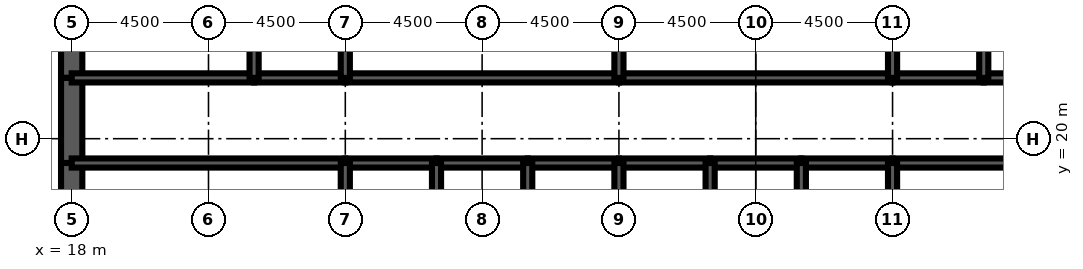
"""IFC4 building model, lengths in metres.
Left out: names, types, materials, properties, quantities, classifications, styles, units other than length and angle.
Written with IfcOpenShell. Run it as: python <this file> out.ifc"""

import sys

from ifc_helpers import new_model, si_unit, direction, frame, frame_2d, origin, place, context, subcontext, project, spatial, rectangle, extrude, element, fill, save


model = new_model("IFC4")
c1 = context("Model", 3, precision=1e-05, world=origin(), true_north=direction((0.0, 1.0)))
c2 = subcontext(c1, "Body", "Model", "MODEL_VIEW")
j1 = project(units=[si_unit("LENGTHUNIT", "METRE"), si_unit("PLANEANGLEUNIT", "RADIAN")], contexts=[c1])
p1 = place(None, origin())
s1 = spatial("IfcSite", under=j1, at=p1, CompositionType="ELEMENT")
p2 = place(p1, origin())
s2 = spatial("IfcBuilding", under=s1, at=p2, CompositionType="ELEMENT")
p3 = place(p2, frame((0.0, 0.0, 283.7)))
s3 = spatial("IfcBuildingStorey", under=s2, at=p3, CompositionType="ELEMENT", Elevation=283.7)
p4 = place(p3, frame((18.0, 26.0, 0.0), z_axis=(0.0, 0.0, 1.0), x_axis=(0.0, -1.0, 0.0)))
e1 = element("IfcWall", 1, at=p4, inside=s3, PredefinedType="SHEAR", context=c2, shape_type="SweptSolid", body=[
    extrude(rectangle(XDim=4.0, YDim=0.7, at=frame_2d((2.0, 0.0))), origin(), (0.0, 0.0, 1.0), 4.2),
])
p5 = place(p3, frame((18.0, 22.0, 0.0), z_axis=(0.0, 0.0, 1.0), x_axis=(0.0, -1.0, 0.0)))
e2 = element("IfcWall", 2, at=p5, inside=s3, PredefinedType="SHEAR", context=c2, shape_type="SweptSolid", body=[
    extrude(rectangle(XDim=2.8, YDim=0.7, at=frame_2d((1.4, 0.0))), origin(), (0.0, 0.0, 1.0), 4.2),
])
p6 = place(p5, frame((0.6, 0.0, 0.0)))
e3 = element("IfcOpeningElement", 3, at=p6, cuts=e2, PredefinedType="OPENING", context=c2, shape_type="SweptSolid", body=[
    extrude(rectangle(XDim=1.8, YDim=2.1, at=frame_2d((0.9, 1.05))), frame((0.0, 0.36, 0.0), z_axis=(0.0, -1.0, 0.0), x_axis=(1.0, 0.0, 0.0)), (0.0, 0.0, 1.0), 0.72),
])
p7 = place(p3, frame((18.0, 19.2, 0.0), z_axis=(0.0, 0.0, 1.0), x_axis=(0.0, -1.0, 0.0)))
e4 = element("IfcWall", 4, at=p7, inside=s3, PredefinedType="SHEAR", context=c2, shape_type="SweptSolid", body=[
    extrude(rectangle(XDim=3.2, YDim=0.7, at=frame_2d((1.6, 0.0))), origin(), (0.0, 0.0, 1.0), 4.2),
])
p8 = place(p3, frame((18.0, 19.2, 0.0), z_axis=(0.0, 0.0, 1.0), x_axis=(1.0, 0.0, 0.0)))
e5 = element("IfcWall", 5, at=p8, inside=s3, PredefinedType="SOLIDWALL", context=c2, shape_type="SweptSolid", body=[
    extrude(rectangle(XDim=9.0, YDim=0.3, at=frame_2d((4.5, 0.0))), origin(), (0.0, 0.0, 1.0), 4.2),
])
p9 = place(p8, frame((0.65, 0.0, 0.0)))
e6 = element("IfcOpeningElement", 6, at=p9, cuts=e5, PredefinedType="OPENING", context=c2, shape_type="SweptSolid", body=[
    extrude(rectangle(XDim=1.0, YDim=2.1, at=frame_2d((0.5, 1.05))), frame((0.0, 0.16, 0.0), z_axis=(0.0, -1.0, 0.0), x_axis=(1.0, 0.0, 0.0)), (0.0, 0.0, 1.0), 0.32),
])
p10 = place(p3, frame((27.0, 19.2, 0.0), z_axis=(0.0, 0.0, 1.0), x_axis=(1.0, 0.0, 0.0)))
e7 = element("IfcWall", 7, at=p10, inside=s3, PredefinedType="SOLIDWALL", context=c2, shape_type="SweptSolid", body=[
    extrude(rectangle(XDim=3.0, YDim=0.3, at=frame_2d((1.5, 0.0))), origin(), (0.0, 0.0, 1.0), 4.2),
])
p11 = place(p10, frame((0.95, 0.0, 0.0)))
e8 = element("IfcOpeningElement", 8, at=p11, cuts=e7, PredefinedType="OPENING", context=c2, shape_type="SweptSolid", body=[
    extrude(rectangle(XDim=1.1, YDim=2.2, at=frame_2d((0.55, 1.1))), frame((0.0, 0.16, 0.0), z_axis=(0.0, -1.0, 0.0), x_axis=(1.0, 0.0, 0.0)), (0.0, 0.0, 1.0), 0.32),
])
p12 = place(p3, frame((30.0, 19.2, 0.0), z_axis=(0.0, 0.0, 1.0), x_axis=(1.0, 0.0, 0.0)))
e9 = element("IfcWall", 9, at=p12, inside=s3, PredefinedType="SOLIDWALL", context=c2, shape_type="SweptSolid", body=[
    extrude(rectangle(XDim=3.0, YDim=0.3, at=frame_2d((1.5, 0.0))), origin(), (0.0, 0.0, 1.0), 4.2),
])
p13 = place(p12, frame((0.95, 0.0, 0.0)))
e10 = element("IfcOpeningElement", 10, at=p13, cuts=e9, PredefinedType="OPENING", context=c2, shape_type="SweptSolid", body=[
    extrude(rectangle(XDim=1.1, YDim=2.2, at=frame_2d((0.55, 1.1))), frame((0.0, 0.16, 0.0), z_axis=(0.0, -1.0, 0.0), x_axis=(1.0, 0.0, 0.0)), (0.0, 0.0, 1.0), 0.32),
])
p14 = place(p3, frame((33.0, 19.2, 0.0), z_axis=(0.0, 0.0, 1.0), x_axis=(1.0, 0.0, 0.0)))
e11 = element("IfcWall", 11, at=p14, inside=s3, PredefinedType="SOLIDWALL", context=c2, shape_type="SweptSolid", body=[
    extrude(rectangle(XDim=3.0, YDim=0.3, at=frame_2d((1.5, 0.0))), origin(), (0.0, 0.0, 1.0), 4.2),
])
p15 = place(p14, frame((0.95, 0.0, 0.0)))
e12 = element("IfcOpeningElement", 12, at=p15, cuts=e11, PredefinedType="OPENING", context=c2, shape_type="SweptSolid", body=[
    extrude(rectangle(XDim=1.1, YDim=2.2, at=frame_2d((0.55, 1.1))), frame((0.0, 0.16, 0.0), z_axis=(0.0, -1.0, 0.0), x_axis=(1.0, 0.0, 0.0)), (0.0, 0.0, 1.0), 0.32),
])
p16 = place(p3, frame((36.0, 19.2, 0.0), z_axis=(0.0, 0.0, 1.0), x_axis=(1.0, 0.0, 0.0)))
e13 = element("IfcWall", 13, at=p16, inside=s3, PredefinedType="SOLIDWALL", context=c2, shape_type="SweptSolid", body=[
    extrude(rectangle(XDim=3.0, YDim=0.3, at=frame_2d((1.5, 0.0))), origin(), (0.0, 0.0, 1.0), 4.2),
])
p17 = place(p16, frame((0.95, 0.0, 0.0)))
e14 = element("IfcOpeningElement", 14, at=p17, cuts=e13, PredefinedType="OPENING", context=c2, shape_type="SweptSolid", body=[
    extrude(rectangle(XDim=1.1, YDim=2.2, at=frame_2d((0.55, 1.1))), frame((0.0, 0.16, 0.0), z_axis=(0.0, -1.0, 0.0), x_axis=(1.0, 0.0, 0.0)), (0.0, 0.0, 1.0), 0.32),
])
p18 = place(p3, frame((39.0, 19.2, 0.0), z_axis=(0.0, 0.0, 1.0), x_axis=(1.0, 0.0, 0.0)))
e15 = element("IfcWall", 15, at=p18, inside=s3, PredefinedType="SOLIDWALL", context=c2, shape_type="SweptSolid", body=[
    extrude(rectangle(XDim=3.0, YDim=0.3, at=frame_2d((1.5, 0.0))), origin(), (0.0, 0.0, 1.0), 4.2),
])
p19 = place(p18, frame((1.0, 0.0, 0.0)))
e16 = element("IfcOpeningElement", 16, at=p19, cuts=e15, PredefinedType="OPENING", context=c2, shape_type="SweptSolid", body=[
    extrude(rectangle(XDim=1.0, YDim=2.1, at=frame_2d((0.5, 1.05))), frame((0.0, 0.16, 0.0), z_axis=(0.0, -1.0, 0.0), x_axis=(1.0, 0.0, 0.0)), (0.0, 0.0, 1.0), 0.32),
])
p20 = place(p3, frame((42.0, 19.2, 0.0), z_axis=(0.0, 0.0, 1.0), x_axis=(1.0, 0.0, 0.0)))
e17 = element("IfcWall", 17, at=p20, inside=s3, PredefinedType="SOLIDWALL", context=c2, shape_type="SweptSolid", body=[
    extrude(rectangle(XDim=3.0, YDim=0.3, at=frame_2d((1.5, 0.0))), origin(), (0.0, 0.0, 1.0), 4.2),
])
p21 = place(p20, frame((1.0, 0.0, 0.0)))
e18 = element("IfcOpeningElement", 18, at=p21, cuts=e17, PredefinedType="OPENING", context=c2, shape_type="SweptSolid", body=[
    extrude(rectangle(XDim=1.0, YDim=2.1, at=frame_2d((0.5, 1.05))), frame((0.0, 0.16, 0.0), z_axis=(0.0, -1.0, 0.0), x_axis=(1.0, 0.0, 0.0)), (0.0, 0.0, 1.0), 0.32),
])
p22 = place(p3, frame((45.0, 19.2, 0.0), z_axis=(0.0, 0.0, 1.0), x_axis=(1.0, 0.0, 0.0)))
e19 = element("IfcWall", 19, at=p22, inside=s3, PredefinedType="SOLIDWALL", context=c2, shape_type="SweptSolid", body=[
    extrude(rectangle(XDim=9.0, YDim=0.3, at=frame_2d((4.5, 0.0))), origin(), (0.0, 0.0, 1.0), 4.2),
])
p23 = place(p22, frame((7.35, 0.0, 0.0)))
e20 = element("IfcOpeningElement", 20, at=p23, cuts=e19, PredefinedType="OPENING", context=c2, shape_type="SweptSolid", body=[
    extrude(rectangle(XDim=1.0, YDim=2.1, at=frame_2d((0.5, 1.05))), frame((0.0, 0.16, 0.0), z_axis=(0.0, -1.0, 0.0), x_axis=(1.0, 0.0, 0.0)), (0.0, 0.0, 1.0), 0.32),
])
p24 = place(p3, frame((18.0, 22.0, 0.0), z_axis=(0.0, 0.0, 1.0), x_axis=(1.0, 0.0, 0.0)))
e21 = element("IfcWall", 21, at=p24, inside=s3, PredefinedType="SOLIDWALL", context=c2, shape_type="SweptSolid", body=[
    extrude(rectangle(XDim=6.0, YDim=0.3, at=frame_2d((3.0, 0.0))), origin(), (0.0, 0.0, 1.0), 4.2),
])
p25 = place(p24, frame((4.4, 0.0, 0.0)))
e22 = element("IfcOpeningElement", 22, at=p25, cuts=e21, PredefinedType="OPENING", context=c2, shape_type="SweptSolid", body=[
    extrude(rectangle(XDim=1.0, YDim=2.1, at=frame_2d((0.5, 1.05))), frame((0.0, 0.16, 0.0), z_axis=(0.0, -1.0, 0.0), x_axis=(1.0, 0.0, 0.0)), (0.0, 0.0, 1.0), 0.32),
])
p26 = place(p24, frame((0.6, 0.0, 0.0)))
e23 = element("IfcOpeningElement", 23, at=p26, cuts=e21, PredefinedType="OPENING", context=c2, shape_type="SweptSolid", body=[
    extrude(rectangle(XDim=1.0, YDim=2.1, at=frame_2d((0.5, 1.05))), frame((0.0, 0.16, 0.0), z_axis=(0.0, -1.0, 0.0), x_axis=(1.0, 0.0, 0.0)), (0.0, 0.0, 1.0), 0.32),
])
p27 = place(p3, frame((24.0, 22.0, 0.0), z_axis=(0.0, 0.0, 1.0), x_axis=(1.0, 0.0, 0.0)))
e24 = element("IfcWall", 24, at=p27, inside=s3, PredefinedType="SOLIDWALL", context=c2, shape_type="SweptSolid", body=[
    extrude(rectangle(XDim=3.0, YDim=0.3, at=frame_2d((1.5, 0.0))), origin(), (0.0, 0.0, 1.0), 4.2),
])
p28 = place(p27, frame((1.0, 0.0, 0.0)))
e25 = element("IfcOpeningElement", 25, at=p28, cuts=e24, PredefinedType="OPENING", context=c2, shape_type="SweptSolid", body=[
    extrude(rectangle(XDim=1.0, YDim=2.1, at=frame_2d((0.5, 1.05))), frame((0.0, 0.16, 0.0), z_axis=(0.0, -1.0, 0.0), x_axis=(1.0, 0.0, 0.0)), (0.0, 0.0, 1.0), 0.32),
])
p29 = place(p3, frame((27.0, 22.0, 0.0), z_axis=(0.0, 0.0, 1.0), x_axis=(1.0, 0.0, 0.0)))
e26 = element("IfcWall", 26, at=p29, inside=s3, PredefinedType="SOLIDWALL", context=c2, shape_type="SweptSolid", body=[
    extrude(rectangle(XDim=9.0, YDim=0.3, at=frame_2d((4.5, 0.0))), origin(), (0.0, 0.0, 1.0), 4.2),
])
p30 = place(p29, frame((4.0, 0.0, 0.0)))
e27 = element("IfcOpeningElement", 27, at=p30, cuts=e26, PredefinedType="OPENING", context=c2, shape_type="SweptSolid", body=[
    extrude(rectangle(XDim=1.0, YDim=2.1, at=frame_2d((0.5, 1.05))), frame((0.0, 0.16, 0.0), z_axis=(0.0, -1.0, 0.0), x_axis=(1.0, 0.0, 0.0)), (0.0, 0.0, 1.0), 0.32),
])
p31 = place(p3, frame((36.0, 22.0, 0.0), z_axis=(0.0, 0.0, 1.0), x_axis=(1.0, 0.0, 0.0)))
e28 = element("IfcWall", 28, at=p31, inside=s3, PredefinedType="SOLIDWALL", context=c2, shape_type="SweptSolid", body=[
    extrude(rectangle(XDim=9.0, YDim=0.3, at=frame_2d((4.5, 0.0))), origin(), (0.0, 0.0, 1.0), 4.2),
])
p32 = place(p31, frame((4.0, 0.0, 0.0)))
e29 = element("IfcOpeningElement", 29, at=p32, cuts=e28, PredefinedType="OPENING", context=c2, shape_type="SweptSolid", body=[
    extrude(rectangle(XDim=1.0, YDim=2.1, at=frame_2d((0.5, 1.05))), frame((0.0, 0.16, 0.0), z_axis=(0.0, -1.0, 0.0), x_axis=(1.0, 0.0, 0.0)), (0.0, 0.0, 1.0), 0.32),
])
p33 = place(p3, frame((45.0, 22.0, 0.0), z_axis=(0.0, 0.0, 1.0), x_axis=(1.0, 0.0, 0.0)))
e30 = element("IfcWall", 30, at=p33, inside=s3, PredefinedType="SOLIDWALL", context=c2, shape_type="SweptSolid", body=[
    extrude(rectangle(XDim=3.0, YDim=0.3, at=frame_2d((1.5, 0.0))), origin(), (0.0, 0.0, 1.0), 4.2),
])
p34 = place(p33, frame((1.0, 0.0, 0.0)))
e31 = element("IfcOpeningElement", 31, at=p34, cuts=e30, PredefinedType="OPENING", context=c2, shape_type="SweptSolid", body=[
    extrude(rectangle(XDim=1.0, YDim=2.1, at=frame_2d((0.5, 1.05))), frame((0.0, 0.16, 0.0), z_axis=(0.0, -1.0, 0.0), x_axis=(1.0, 0.0, 0.0)), (0.0, 0.0, 1.0), 0.32),
])
p35 = place(p3, frame((48.0, 22.0, 0.0), z_axis=(0.0, 0.0, 1.0), x_axis=(1.0, 0.0, 0.0)))
e32 = element("IfcWall", 32, at=p35, inside=s3, PredefinedType="SOLIDWALL", context=c2, shape_type="SweptSolid", body=[
    extrude(rectangle(XDim=6.0, YDim=0.3, at=frame_2d((3.0, 0.0))), origin(), (0.0, 0.0, 1.0), 4.2),
])
p36 = place(p35, frame((2.0, 0.0, 0.0)))
e33 = element("IfcOpeningElement", 33, at=p36, cuts=e32, PredefinedType="OPENING", context=c2, shape_type="SweptSolid", body=[
    extrude(rectangle(XDim=1.0, YDim=2.1, at=frame_2d((0.5, 1.05))), frame((0.0, 0.16, 0.0), z_axis=(0.0, -1.0, 0.0), x_axis=(1.0, 0.0, 0.0)), (0.0, 0.0, 1.0), 0.32),
])
p37 = place(p35, frame((4.4, 0.0, 0.0)))
e34 = element("IfcOpeningElement", 34, at=p37, cuts=e32, PredefinedType="OPENING", context=c2, shape_type="SweptSolid", body=[
    extrude(rectangle(XDim=1.0, YDim=2.1, at=frame_2d((0.5, 1.05))), frame((0.0, 0.16, 0.0), z_axis=(0.0, -1.0, 0.0), x_axis=(1.0, 0.0, 0.0)), (0.0, 0.0, 1.0), 0.32),
])
for number, where, z_axis, x_axis in (
    (35, (27.0, 16.0, 0.0), (0.0, 0.0, 1.0), (0.0, 1.0, 0.0)),
    (36, (30.0, 16.0, 0.0), (0.0, 0.0, 1.0), (0.0, 1.0, 0.0)),
    (37, (33.0, 16.0, 0.0), (0.0, 0.0, 1.0), (0.0, 1.0, 0.0)),
    (38, (36.0, 16.0, 0.0), (0.0, 0.0, 1.0), (0.0, 1.0, 0.0)),
    (39, (39.0, 16.0, 0.0), (0.0, 0.0, 1.0), (0.0, 1.0, 0.0)),
    (40, (42.0, 16.0, 0.0), (0.0, 0.0, 1.0), (0.0, 1.0, 0.0)),
    (41, (45.0, 16.0, 0.0), (0.0, 0.0, 1.0), (0.0, 1.0, 0.0)),
):
    element("IfcWall", number, at=place(p3, frame(where, z_axis=z_axis, x_axis=x_axis)), inside=s3, PredefinedType="SOLIDWALL", context=c2, shape_type="SweptSolid", body=[
        extrude(rectangle(XDim=3.2, YDim=0.3, at=frame_2d((1.6, 0.0))), origin(), (0.0, 0.0, 1.0), 4.2),
    ])
for number, where, z_axis, x_axis in (
    (42, (24.0, 22.0, 0.0), (0.0, 0.0, 1.0), (0.0, 1.0, 0.0)),
    (43, (27.0, 22.0, 0.0), (0.0, 0.0, 1.0), (0.0, 1.0, 0.0)),
    (44, (36.0, 22.0, 0.0), (0.0, 0.0, 1.0), (0.0, 1.0, 0.0)),
    (45, (45.0, 22.0, 0.0), (0.0, 0.0, 1.0), (0.0, 1.0, 0.0)),
    (46, (48.0, 22.0, 0.0), (0.0, 0.0, 1.0), (0.0, 1.0, 0.0)),
):
    element("IfcWall", number, at=place(p3, frame(where, z_axis=z_axis, x_axis=x_axis)), inside=s3, PredefinedType="SOLIDWALL", context=c2, shape_type="SweptSolid", body=[
        extrude(rectangle(XDim=4.0, YDim=0.3, at=frame_2d((2.0, 0.0))), origin(), (0.0, 0.0, 1.0), 4.2),
    ])
p38 = place(p3, frame((38.0, 22.15, 0.0), z_axis=(0.0, 0.0, 1.0), x_axis=(0.0, 1.0, 0.0)))
e47 = element("IfcWall", 47, at=p38, inside=s3, PredefinedType="PARTITIONING", context=c2, shape_type="SweptSolid", body=[
    extrude(rectangle(XDim=3.7, YDim=0.15, at=frame_2d((1.85, 0.0))), origin(), (0.0, 0.0, 1.0), 3.0),
])
p39 = place(p38, frame((2.2, 0.0, 0.0)))
e48 = element("IfcOpeningElement", 48, at=p39, cuts=e47, PredefinedType="OPENING", context=c2, shape_type="SweptSolid", body=[
    extrude(rectangle(XDim=1.0, YDim=2.1, at=frame_2d((0.5, 1.05))), frame((0.0, 0.085, 0.0), z_axis=(0.0, -1.0, 0.0), x_axis=(1.0, 0.0, 0.0)), (0.0, 0.0, 1.0), 0.17),
])
p40 = place(p3, frame((19.925, 22.15, 0.0), z_axis=(0.0, 0.0, 1.0), x_axis=(0.0, 1.0, 0.0)))
e49 = element("IfcWall", 49, at=p40, inside=s3, PredefinedType="PARTITIONING", context=c2, shape_type="SweptSolid", body=[
    extrude(rectangle(XDim=3.7, YDim=0.15, at=frame_2d((1.85, 0.0))), origin(), (0.0, 0.0, 1.0), 3.0),
])
p41 = place(p3, frame((47.7, 19.35, 0.0), z_axis=(0.0, 0.0, 1.0), x_axis=(0.0, 1.0, 0.0)))
e50 = element("IfcWall", 50, at=p41, inside=s3, PredefinedType="PARTITIONING", context=c2, shape_type="SweptSolid", body=[
    extrude(rectangle(XDim=2.5, YDim=0.15, at=frame_2d((1.25, 0.0))), origin(), (0.0, 0.0, 1.0), 3.0),
])
p42 = place(p41, frame((1.15, 0.0, 0.0)))
e51 = element("IfcOpeningElement", 51, at=p42, cuts=e50, PredefinedType="OPENING", context=c2, shape_type="SweptSolid", body=[
    extrude(rectangle(XDim=1.0, YDim=2.1, at=frame_2d((0.5, 1.05))), frame((0.0, 0.085, 0.0), z_axis=(0.0, -1.0, 0.0), x_axis=(1.0, 0.0, 0.0)), (0.0, 0.0, 1.0), 0.17),
])
p43 = place(p42, origin())
e52 = element("IfcDoor", 52, at=p43, inside=s3, OperationType="SINGLE_SWING_RIGHT", PredefinedType="DOOR", context=c2, shape_type="SweptSolid", body=[
    extrude(rectangle(XDim=1.0, YDim=2.1, at=frame_2d((0.5, 1.05))), frame((0.0, 0.025, 0.0), z_axis=(0.0, -1.0, 0.0), x_axis=(1.0, 0.0, 0.0)), (0.0, 0.0, 1.0), 0.05),
])
fill(e51, e52)
p44 = place(p11, origin())
e53 = element("IfcDoor", 53, at=p44, inside=s3, OperationType="DOUBLE_DOOR_SLIDING", PredefinedType="USERDEFINED", context=c2, shape_type="SweptSolid", body=[
    extrude(rectangle(XDim=1.1, YDim=2.2, at=frame_2d((0.55, 1.1))), frame((0.0, 0.025, 0.0), z_axis=(0.0, -1.0, 0.0), x_axis=(1.0, 0.0, 0.0)), (0.0, 0.0, 1.0), 0.05),
])
fill(e8, e53)
p45 = place(p13, origin())
e54 = element("IfcDoor", 54, at=p45, inside=s3, OperationType="DOUBLE_DOOR_SLIDING", PredefinedType="USERDEFINED", context=c2, shape_type="SweptSolid", body=[
    extrude(rectangle(XDim=1.1, YDim=2.2, at=frame_2d((0.55, 1.1))), frame((0.0, 0.025, 0.0), z_axis=(0.0, -1.0, 0.0), x_axis=(1.0, 0.0, 0.0)), (0.0, 0.0, 1.0), 0.05),
])
fill(e10, e54)
p46 = place(p15, origin())
e55 = element("IfcDoor", 55, at=p46, inside=s3, OperationType="DOUBLE_DOOR_SLIDING", PredefinedType="USERDEFINED", context=c2, shape_type="SweptSolid", body=[
    extrude(rectangle(XDim=1.1, YDim=2.2, at=frame_2d((0.55, 1.1))), frame((0.0, 0.025, 0.0), z_axis=(0.0, -1.0, 0.0), x_axis=(1.0, 0.0, 0.0)), (0.0, 0.0, 1.0), 0.05),
])
fill(e12, e55)
p47 = place(p17, origin())
e56 = element("IfcDoor", 56, at=p47, inside=s3, OperationType="DOUBLE_DOOR_SLIDING", PredefinedType="USERDEFINED", context=c2, shape_type="SweptSolid", body=[
    extrude(rectangle(XDim=1.1, YDim=2.2, at=frame_2d((0.55, 1.1))), frame((0.0, 0.025, 0.0), z_axis=(0.0, -1.0, 0.0), x_axis=(1.0, 0.0, 0.0)), (0.0, 0.0, 1.0), 0.05),
])
fill(e14, e56)
p48 = place(p9, origin())
e57 = element("IfcDoor", 57, at=p48, inside=s3, OperationType="SINGLE_SWING_LEFT", PredefinedType="DOOR", context=c2, shape_type="SweptSolid", body=[
    extrude(rectangle(XDim=1.0, YDim=2.1, at=frame_2d((0.5, 1.05))), frame((0.0, 0.025, 0.0), z_axis=(0.0, -1.0, 0.0), x_axis=(1.0, 0.0, 0.0)), (0.0, 0.0, 1.0), 0.05),
])
fill(e6, e57)
p49 = place(p6, origin())
e58 = element("IfcDoor", 58, at=p49, inside=s3, OperationType="SINGLE_SWING_LEFT", PredefinedType="DOOR", context=c2, shape_type="SweptSolid", body=[
    extrude(rectangle(XDim=1.8, YDim=2.1, at=frame_2d((0.9, 1.05))), frame((0.0, 0.35, 0.0), z_axis=(0.0, -1.0, 0.0), x_axis=(1.0, 0.0, 0.0)), (0.0, 0.0, 1.0), 0.699),
])
fill(e3, e58)
p50 = place(p25, origin())
e59 = element("IfcDoor", 59, at=p50, inside=s3, OperationType="SINGLE_SWING_RIGHT", PredefinedType="DOOR", context=c2, shape_type="SweptSolid", body=[
    extrude(rectangle(XDim=1.0, YDim=2.1, at=frame_2d((0.5, 1.05))), frame((0.0, 0.025, 0.0), z_axis=(0.0, -1.0, 0.0), x_axis=(1.0, 0.0, 0.0)), (0.0, 0.0, 1.0), 0.05),
])
fill(e22, e59)
p51 = place(p28, origin())
e60 = element("IfcDoor", 60, at=p51, inside=s3, OperationType="SINGLE_SWING_LEFT", PredefinedType="DOOR", context=c2, shape_type="SweptSolid", body=[
    extrude(rectangle(XDim=1.0, YDim=2.1, at=frame_2d((0.5, 1.05))), frame((0.0, 0.025, 0.0), z_axis=(0.0, -1.0, 0.0), x_axis=(1.0, 0.0, 0.0)), (0.0, 0.0, 1.0), 0.05),
])
fill(e25, e60)
p52 = place(p30, origin())
e61 = element("IfcDoor", 61, at=p52, inside=s3, OperationType="SINGLE_SWING_LEFT", PredefinedType="DOOR", context=c2, shape_type="SweptSolid", body=[
    extrude(rectangle(XDim=1.0, YDim=2.1, at=frame_2d((0.5, 1.05))), frame((0.0, 0.025, 0.0), z_axis=(0.0, -1.0, 0.0), x_axis=(1.0, 0.0, 0.0)), (0.0, 0.0, 1.0), 0.05),
])
fill(e27, e61)
p53 = place(p32, origin())
e62 = element("IfcDoor", 62, at=p53, inside=s3, OperationType="SINGLE_SWING_LEFT", PredefinedType="DOOR", context=c2, shape_type="SweptSolid", body=[
    extrude(rectangle(XDim=1.0, YDim=2.1, at=frame_2d((0.5, 1.05))), frame((0.0, 0.025, 0.0), z_axis=(0.0, -1.0, 0.0), x_axis=(1.0, 0.0, 0.0)), (0.0, 0.0, 1.0), 0.05),
])
fill(e29, e62)
p54 = place(p34, origin())
e63 = element("IfcDoor", 63, at=p54, inside=s3, OperationType="SINGLE_SWING_LEFT", PredefinedType="DOOR", context=c2, shape_type="SweptSolid", body=[
    extrude(rectangle(XDim=1.0, YDim=2.1, at=frame_2d((0.5, 1.05))), frame((0.0, 0.025, 0.0), z_axis=(0.0, -1.0, 0.0), x_axis=(1.0, 0.0, 0.0)), (0.0, 0.0, 1.0), 0.05),
])
fill(e31, e63)
p55 = place(p26, origin())
e64 = element("IfcDoor", 64, at=p55, inside=s3, OperationType="SINGLE_SWING_LEFT", PredefinedType="DOOR", context=c2, shape_type="SweptSolid", body=[
    extrude(rectangle(XDim=1.0, YDim=2.1, at=frame_2d((0.5, 1.05))), frame((0.0, 0.025, 0.0), z_axis=(0.0, -1.0, 0.0), x_axis=(1.0, 0.0, 0.0)), (0.0, 0.0, 1.0), 0.05),
])
fill(e23, e64)
p56 = place(p19, origin())
e65 = element("IfcDoor", 65, at=p56, inside=s3, OperationType="SINGLE_SWING_LEFT", PredefinedType="DOOR", context=c2, shape_type="SweptSolid", body=[
    extrude(rectangle(XDim=1.0, YDim=2.1, at=frame_2d((0.5, 1.05))), frame((0.0, 0.025, 0.0), z_axis=(0.0, -1.0, 0.0), x_axis=(1.0, 0.0, 0.0)), (0.0, 0.0, 1.0), 0.05),
])
fill(e16, e65)
p57 = place(p21, origin())
e66 = element("IfcDoor", 66, at=p57, inside=s3, OperationType="SINGLE_SWING_LEFT", PredefinedType="DOOR", context=c2, shape_type="SweptSolid", body=[
    extrude(rectangle(XDim=1.0, YDim=2.1, at=frame_2d((0.5, 1.05))), frame((0.0, 0.025, 0.0), z_axis=(0.0, -1.0, 0.0), x_axis=(1.0, 0.0, 0.0)), (0.0, 0.0, 1.0), 0.05),
])
fill(e18, e66)
save(model, sys.argv[1])
